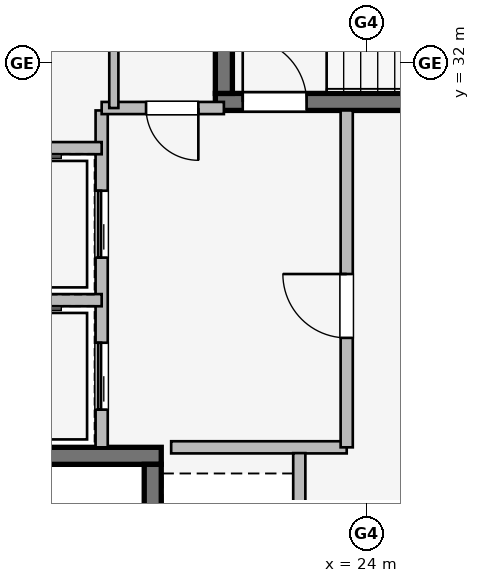
"""IFC4 building model, lengths in metres.
Left out: names, types, materials, properties, quantities, classifications, styles, units other than length and angle.
Written with IfcOpenShell. Run it as: python <this file> out.ifc"""

import sys

from ifc_helpers import new_model, si_unit, direction, frame, frame_2d, origin, place, context, subcontext, project, spatial, rectangle, extrude, element, fill, save


model = new_model("IFC4")
c1 = context("Model", 3, precision=1e-05, world=origin(), true_north=direction((0.0, 1.0)))
c2 = subcontext(c1, "Body", "Model", "MODEL_VIEW")
j1 = project(units=[si_unit("LENGTHUNIT", "METRE"), si_unit("PLANEANGLEUNIT", "RADIAN")], contexts=[c1])
p1 = place(None, origin())
s1 = spatial("IfcSite", under=j1, at=p1, CompositionType="ELEMENT")
p2 = place(p1, origin())
s2 = spatial("IfcBuilding", under=s1, at=p2, CompositionType="ELEMENT")
p3 = place(p2, frame((0.0, 0.0, 59.85)))
s3 = spatial("IfcBuildingStorey", under=s2, at=p3, CompositionType="ELEMENT", Elevation=59.85)
p4 = place(p3, frame((20.63, 25.54, 0.0), z_axis=(0.0, 0.0, 1.0), x_axis=(-1.0, 0.0, 0.0)))
e1 = element("IfcWall", 1, at=p4, inside=s3, PredefinedType="SHEAR", context=c2, shape_type="SweptSolid", body=[
    extrude(rectangle(XDim=3.76, YDim=0.28, at=frame_2d((1.88, 0.0))), origin(), (0.0, 0.0, 1.0), 3.65),
])
p5 = place(p3, frame((20.49, 17.6, 0.0), z_axis=(0.0, 0.0, 1.0), x_axis=(0.0, 1.0, 0.0)))
e2 = element("IfcWall", 2, at=p5, inside=s3, PredefinedType="SHEAR", context=c2, shape_type="SweptSolid", body=[
    extrude(rectangle(XDim=7.8, YDim=0.28, at=frame_2d((3.9, 0.0))), origin(), (0.0, 0.0, 1.0), 3.65),
])
p6 = place(p5, frame((0.44, 0.0, 0.0)))
e3 = element("IfcOpeningElement", 3, at=p6, cuts=e2, PredefinedType="OPENING", context=c2, shape_type="SweptSolid", body=[
    extrude(rectangle(XDim=1.05, YDim=2.0, at=frame_2d((0.525, 1.0))), frame((0.0, 0.15, 0.0), z_axis=(0.0, -1.0, 0.0), x_axis=(1.0, 0.0, 0.0)), (0.0, 0.0, 1.0), 0.3),
])
p7 = place(p3, frame((21.52, 31.36, 0.0), z_axis=(0.0, 0.0, 1.0), x_axis=(1.0, 0.0, 0.0)))
e4 = element("IfcWall", 4, at=p7, inside=s3, PredefinedType="SHEAR", context=c2, shape_type="SweptSolid", body=[
    extrude(rectangle(XDim=8.36, YDim=0.28, at=frame_2d((4.18, 0.0))), origin(), (0.0, 0.0, 1.0), 3.65),
])
p8 = place(p7, frame((0.45, 0.0, 0.0)))
e5 = element("IfcOpeningElement", 5, at=p8, cuts=e4, PredefinedType="OPENING", context=c2, shape_type="SweptSolid", body=[
    extrude(rectangle(XDim=1.05, YDim=2.0, at=frame_2d((0.525, 1.0))), frame((0.0, 0.15, 0.0), z_axis=(0.0, -1.0, 0.0), x_axis=(1.0, 0.0, 0.0)), (0.0, 0.0, 1.0), 0.3),
])
p9 = place(p3, frame((21.66, 34.7, 0.0), z_axis=(0.0, 0.0, 1.0), x_axis=(0.0, -1.0, 0.0)))
e6 = element("IfcWall", 6, at=p9, inside=s3, PredefinedType="SHEAR", context=c2, shape_type="SweptSolid", body=[
    extrude(rectangle(XDim=3.2, YDim=0.28, at=frame_2d((1.6, 0.0))), origin(), (0.0, 0.0, 1.0), 3.65),
])
p10 = place(p3, frame((19.65, 25.68, 0.0), z_axis=(0.0, 0.0, 1.0), x_axis=(0.0, 1.0, 0.0)))
e7 = element("IfcWall", 7, at=p10, inside=s3, PredefinedType="PARTITIONING", context=c2, shape_type="SweptSolid", body=[
    extrude(rectangle(XDim=5.54, YDim=0.2, at=frame_2d((2.77, 0.0))), origin(), (0.0, 0.0, 1.0), 3.39),
])
p11 = place(p10, frame((0.62, 0.0, 0.0)))
e8 = element("IfcOpeningElement", 8, at=p11, cuts=e7, PredefinedType="OPENING", context=c2, shape_type="SweptSolid", body=[
    extrude(rectangle(XDim=1.1, YDim=2.2, at=frame_2d((0.55, 1.1))), frame((0.0, 0.11, 0.0), z_axis=(0.0, -1.0, 0.0), x_axis=(1.0, 0.0, 0.0)), (0.0, 0.0, 1.0), 0.22),
])
p12 = place(p10, frame((3.12, 0.0, 0.0)))
e9 = element("IfcOpeningElement", 9, at=p12, cuts=e7, PredefinedType="OPENING", context=c2, shape_type="SweptSolid", body=[
    extrude(rectangle(XDim=1.1, YDim=2.2, at=frame_2d((0.55, 1.1))), frame((0.0, 0.11, 0.0), z_axis=(0.0, -1.0, 0.0), x_axis=(1.0, 0.0, 0.0)), (0.0, 0.0, 1.0), 0.22),
])
p13 = place(p3, frame((20.793, 25.68, 0.0), z_axis=(0.0, 0.0, 1.0), x_axis=(1.0, 0.0, 0.0)))
e10 = element("IfcWall", 10, at=p13, inside=s3, PredefinedType="PARTITIONING", context=c2, shape_type="SweptSolid", body=[
    extrude(rectangle(XDim=2.887, YDim=0.2, at=frame_2d((1.443, 0.0))), origin(), (0.0, 0.0, 1.0), 3.39),
])
p14 = place(p3, frame((23.68, 25.68, 0.0), z_axis=(0.0, 0.0, 1.0), x_axis=(0.0, 1.0, 0.0)))
e11 = element("IfcWall", 11, at=p14, inside=s3, PredefinedType="PARTITIONING", context=c2, shape_type="SweptSolid", body=[
    extrude(rectangle(XDim=5.54, YDim=0.2, at=frame_2d((2.77, 0.0))), origin(), (0.0, 0.0, 1.0), 3.39),
])
p15 = place(p14, frame((1.8, 0.0, 0.0)))
e12 = element("IfcOpeningElement", 12, at=p15, cuts=e11, PredefinedType="OPENING", context=c2, shape_type="SweptSolid", body=[
    extrude(rectangle(XDim=1.05, YDim=2.0, at=frame_2d((0.525, 1.0))), frame((0.0, 0.11, 0.0), z_axis=(0.0, -1.0, 0.0), x_axis=(1.0, 0.0, 0.0)), (0.0, 0.0, 1.0), 0.22),
])
p16 = place(p3, frame((21.66, 31.26, 0.0), z_axis=(0.0, 0.0, 1.0), x_axis=(-1.0, 0.0, 0.0)))
e13 = element("IfcWall", 13, at=p16, inside=s3, PredefinedType="PARTITIONING", context=c2, shape_type="SweptSolid", body=[
    extrude(rectangle(XDim=2.01, YDim=0.2, at=frame_2d((1.005, 0.0))), origin(), (0.0, 0.0, 1.0), 3.39),
])
p17 = place(p16, frame((0.42, 0.0, 0.0)))
e14 = element("IfcOpeningElement", 14, at=p17, cuts=e13, PredefinedType="OPENING", context=c2, shape_type="SweptSolid", body=[
    extrude(rectangle(XDim=0.86, YDim=2.0, at=frame_2d((0.43, 1.0))), frame((0.0, 0.11, 0.0), z_axis=(0.0, -1.0, 0.0), x_axis=(1.0, 0.0, 0.0)), (0.0, 0.0, 1.0), 0.22),
])
p18 = place(p3, frame((17.15, 28.1, 0.0), z_axis=(0.0, 0.0, 1.0), x_axis=(1.0, 0.0, 0.0)))
e15 = element("IfcWall", 15, at=p18, inside=s3, PredefinedType="PARTITIONING", context=c2, shape_type="SweptSolid", body=[
    extrude(rectangle(XDim=2.5, YDim=0.2, at=frame_2d((1.25, 0.0))), origin(), (0.0, 0.0, 1.0), 3.39),
])
p19 = place(p3, frame((19.65, 30.6, 0.0), z_axis=(0.0, 0.0, 1.0), x_axis=(-1.0, 0.0, 0.0)))
e16 = element("IfcWall", 16, at=p19, inside=s3, PredefinedType="PARTITIONING", context=c2, shape_type="SweptSolid", body=[
    extrude(rectangle(XDim=2.5, YDim=0.2, at=frame_2d((1.25, 0.0))), origin(), (0.0, 0.0, 1.0), 2.29),
])
p20 = place(p3, frame((22.9, 19.5, 0.0), z_axis=(0.0, 0.0, 1.0), x_axis=(0.0, 1.0, 0.0)))
e17 = element("IfcWall", 17, at=p20, inside=s3, PredefinedType="PARTITIONING", context=c2, shape_type="SweptSolid", body=[
    extrude(rectangle(XDim=6.085, YDim=0.2, at=frame_2d((3.042, 0.0))), origin(), (0.0, 0.0, 1.0), 3.39),
])
p21 = place(p3, frame((19.85, 33.45, 0.0), z_axis=(0.0, 0.0, 1.0), x_axis=(0.0, -1.0, 0.0)))
e18 = element("IfcWall", 18, at=p21, inside=s3, PredefinedType="PARTITIONING", context=c2, shape_type="SweptSolid", body=[
    extrude(rectangle(XDim=2.19, YDim=0.15, at=frame_2d((1.095, 0.0))), origin(), (0.0, 0.0, 1.0), 3.39),
])
p22 = place(p8, origin())
e19 = element("IfcDoor", 19, at=p22, inside=s3, OperationType="SINGLE_SWING_LEFT", PredefinedType="DOOR", context=c2, shape_type="SweptSolid", body=[
    extrude(rectangle(XDim=1.05, YDim=2.0, at=frame_2d((0.525, 1.0))), frame((0.0, 0.025, 0.0), z_axis=(0.0, -1.0, 0.0), x_axis=(1.0, 0.0, 0.0)), (0.0, 0.0, 1.0), 0.05),
])
fill(e5, e19)
p23 = place(p11, origin())
e20 = element("IfcDoor", 20, at=p23, inside=s3, OperationType="SLIDING_TO_LEFT", PredefinedType="DOOR", context=c2, shape_type="SweptSolid", body=[
    extrude(rectangle(XDim=1.1, YDim=2.2, at=frame_2d((0.55, 1.1))), frame((0.0, 0.025, 0.0), z_axis=(0.0, -1.0, 0.0), x_axis=(1.0, 0.0, 0.0)), (0.0, 0.0, 1.0), 0.05),
])
fill(e8, e20)
p24 = place(p12, origin())
e21 = element("IfcDoor", 21, at=p24, inside=s3, OperationType="SLIDING_TO_LEFT", PredefinedType="DOOR", context=c2, shape_type="SweptSolid", body=[
    extrude(rectangle(XDim=1.1, YDim=2.2, at=frame_2d((0.55, 1.1))), frame((0.0, 0.025, 0.0), z_axis=(0.0, -1.0, 0.0), x_axis=(1.0, 0.0, 0.0)), (0.0, 0.0, 1.0), 0.05),
])
fill(e9, e21)
p25 = place(p15, origin())
e22 = element("IfcDoor", 22, at=p25, inside=s3, OperationType="SINGLE_SWING_RIGHT", PredefinedType="DOOR", context=c2, shape_type="SweptSolid", body=[
    extrude(rectangle(XDim=1.05, YDim=2.0, at=frame_2d((0.525, 1.0))), frame((0.0, 0.025, 0.0), z_axis=(0.0, -1.0, 0.0), x_axis=(1.0, 0.0, 0.0)), (0.0, 0.0, 1.0), 0.05),
])
fill(e12, e22)
p26 = place(p17, origin())
e23 = element("IfcDoor", 23, at=p26, inside=s3, OperationType="SINGLE_SWING_LEFT", PredefinedType="DOOR", context=c2, shape_type="SweptSolid", body=[
    extrude(rectangle(XDim=0.86, YDim=2.0, at=frame_2d((0.43, 1.0))), frame((0.0, 0.025, 0.0), z_axis=(0.0, -1.0, 0.0), x_axis=(1.0, 0.0, 0.0)), (0.0, 0.0, 1.0), 0.05),
])
fill(e14, e23)
save(model, sys.argv[1])
